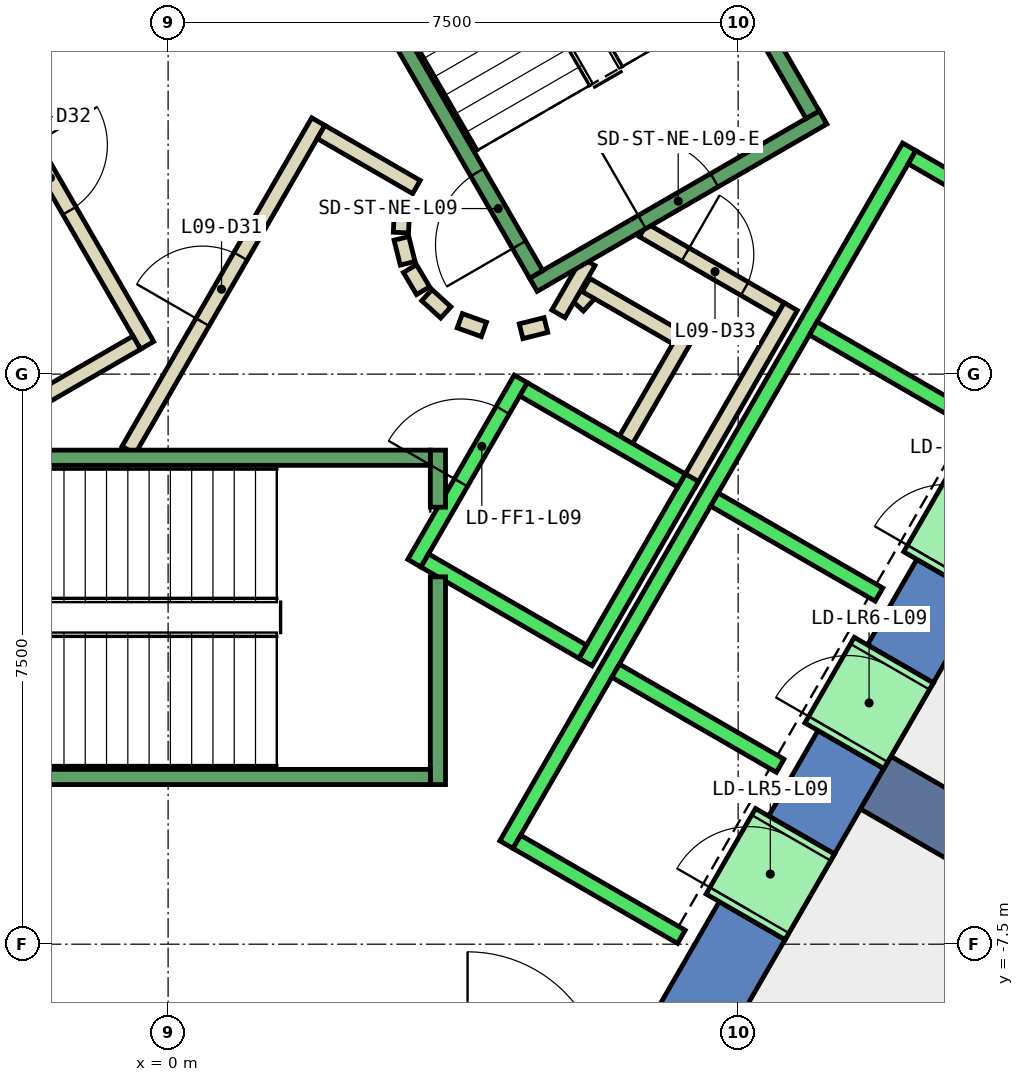
"""IFC4 building model, lengths in metres.
Left out: names, types, materials, properties, quantities, classifications, styles, units other than length and angle.
Written with IfcOpenShell. Run it as: python <this file> out.ifc"""

import sys

from ifc_helpers import new_model, si_unit, direction, frame, frame_2d, origin, place, context, subcontext, project, spatial, polyline, rectangle, outline, extrude, element, fill, save


model = new_model("IFC4")
c1 = context("Model", 3, precision=1e-05, world=origin(), true_north=direction((0.0, 1.0)))
c2 = subcontext(c1, "Body", "Model", "MODEL_VIEW")
j1 = project(units=[si_unit("LENGTHUNIT", "METRE"), si_unit("PLANEANGLEUNIT", "RADIAN")], contexts=[c1])
p1 = place(None, origin())
s1 = spatial("IfcSite", under=j1, at=p1, CompositionType="ELEMENT")
p2 = place(p1, origin())
s2 = spatial("IfcBuilding", under=s1, at=p2, CompositionType="ELEMENT")
p3 = place(p2, frame((0.0, 0.0, 47.6)))
s3 = spatial("IfcBuildingStorey", under=s2, at=p3, CompositionType="ELEMENT", Elevation=47.6)
p4 = place(p3, frame((0.0, 0.0, -0.4)))
e1 = element("IfcWall", 1, at=p4, inside=s3, PredefinedType="SHEAR", context=c2, shape_type="SweptSolid", body=[
    extrude(outline(polyline([(8.517, 11.748), (7.651, 11.248), (12.702, 2.5), (13.856, 2.5), (8.517, 11.748)])), origin(), (0.0, 0.0, 1.0), 4.2),
])
p5 = place(p3, frame((0.0, 0.0, -0.4)))
e2 = element("IfcWall", 2, at=p5, inside=s3, PredefinedType="SHEAR", context=c2, shape_type="SweptSolid", body=[
    extrude(outline(polyline([(8.117, -7.44), (7.252, -6.94), (6.351, -8.5), (6.928, -9.5), (8.117, -7.44)])), origin(), (0.0, 0.0, 1.0), 4.2),
])
p6 = place(p3, frame((0.0, 0.0, -0.4)))
e3 = element("IfcWall", 3, at=p6, inside=s3, PredefinedType="SHEAR", context=c2, shape_type="SweptSolid", body=[
    extrude(outline(polyline([(9.417, -5.189), (8.551, -4.689), (7.902, -5.814), (8.767, -6.314), (9.417, -5.189)])), origin(), (0.0, 0.0, 1.0), 4.2),
])
p7 = place(p3, frame((0.0, 0.0, -0.4)))
e4 = element("IfcWall", 4, at=p7, inside=s3, PredefinedType="SHEAR", context=c2, shape_type="SweptSolid", body=[
    extrude(outline(polyline([(10.717, -2.937), (9.851, -2.437), (9.201, -3.563), (10.067, -4.063), (10.717, -2.937)])), origin(), (0.0, 0.0, 1.0), 4.2),
])
p8 = place(p3, frame((0.0, 0.0, 3.6)))
e5 = element("IfcWall", 5, at=p8, inside=s3, PredefinedType="SHEAR", context=c2, shape_type="SweptSolid", body=[
    extrude(outline(polyline([(8.767, -6.314), (7.902, -5.814), (7.252, -6.94), (8.117, -7.44), (8.767, -6.314)])), origin(), (0.0, 0.0, 1.0), 0.2),
])
p9 = place(p3, frame((0.0, 0.0, 3.6)))
e6 = element("IfcWall", 6, at=p9, inside=s3, PredefinedType="SHEAR", context=c2, shape_type="SweptSolid", body=[
    extrude(outline(polyline([(10.067, -4.063), (9.201, -3.563), (8.551, -4.689), (9.417, -5.189), (10.067, -4.063)])), origin(), (0.0, 0.0, 1.0), 0.2),
])
p10 = place(p3, frame((0.0, 0.0, 3.6)))
e7 = element("IfcWall", 7, at=p10, inside=s3, PredefinedType="SHEAR", context=c2, shape_type="SweptSolid", body=[
    extrude(outline(polyline([(11.367, -1.811), (10.501, -1.311), (9.851, -2.437), (10.717, -2.937), (11.367, -1.811)])), origin(), (0.0, 0.0, 1.0), 0.2),
])
p11 = place(p3, frame((9.31, -5.375, -0.4), z_axis=(0.0, 0.0, 1.0), x_axis=(0.866017533419, -0.500013631625, 0.0)))
e8 = element("IfcWall", 8, at=p11, inside=s3, PredefinedType="SHEAR", context=c2, shape_type="SweptSolid", body=[
    extrude(rectangle(XDim=9.0, YDim=0.8, at=frame_2d((4.5, 0.0))), origin(), (0.0, 0.0, 1.0), 4.2),
])
p12 = place(p3, frame((5.39, 0.898, 0.0), z_axis=(0.0, 0.0, 1.0), x_axis=(0.673828488714, 0.738887791073, 0.0)))
e9 = element("IfcWall", 9, at=p12, inside=s3, PredefinedType="PARTITIONING", context=c2, shape_type="SweptSolid", body=[
    extrude(rectangle(XDim=0.263, YDim=0.2, at=frame_2d((0.131, 0.0))), origin(), (0.0, 0.0, 1.0), 3.8),
])
p13 = place(p3, frame((5.499, 1.172, 0.0), z_axis=(0.0, 0.0, 1.0), x_axis=(0.866333505267, -0.499465972466, 0.0)))
e10 = element("IfcWall", 10, at=p13, inside=s3, PredefinedType="PARTITIONING", context=c2, shape_type="SweptSolid", body=[
    extrude(rectangle(XDim=1.374, YDim=0.2, at=frame_2d((0.687, 0.0))), origin(), (0.0, 0.0, 1.0), 3.8),
])
p14 = place(p3, frame((6.826, 0.522, 0.0), z_axis=(0.0, 0.0, 1.0), x_axis=(-0.500016722714, -0.866015748706, 0.0)))
e11 = element("IfcWall", 11, at=p14, inside=s3, PredefinedType="PARTITIONING", context=c2, shape_type="SweptSolid", body=[
    extrude(rectangle(XDim=1.7, YDim=0.2, at=frame_2d((0.85, 0.0))), origin(), (0.0, 0.0, 1.0), 3.8),
])
p15 = place(p3, frame((6.25, 1.894, 0.0), z_axis=(0.0, 0.0, 1.0), x_axis=(0.866043184279, -0.499969202016, 0.0)))
e12 = element("IfcWall", 12, at=p15, inside=s3, PredefinedType="PARTITIONING", context=c2, shape_type="SweptSolid", body=[
    extrude(rectangle(XDim=2.084, YDim=0.2, at=frame_2d((1.042, 0.0))), origin(), (0.0, 0.0, 1.0), 3.8),
])
p16 = place(p15, frame((0.642, 0.0, 0.0)))
e13 = element("IfcOpeningElement", 13, at=p16, cuts=e12, PredefinedType="OPENING", context=c2, shape_type="SweptSolid", body=[
    extrude(rectangle(XDim=0.9, YDim=2.1, at=frame_2d((0.45, 1.05))), frame((0.0, 0.11, 0.0), z_axis=(0.0, -1.0, 0.0), x_axis=(1.0, 0.0, 0.0)), (0.0, 0.0, 1.0), 0.22),
])
p17 = place(p3, frame((8.192, 0.888, 0.0), z_axis=(0.0, 0.0, 1.0), x_axis=(-0.499940625693, -0.866059680843, 0.0)))
e14 = element("IfcWall", 14, at=p17, inside=s3, PredefinedType="PARTITIONING", context=c2, shape_type="SweptSolid", body=[
    extrude(rectangle(XDim=2.68, YDim=0.2, at=frame_2d((1.34, 0.0))), origin(), (0.0, 0.0, 1.0), 3.8),
])
p18 = place(p3, frame((5.135, 0.793, 0.0), z_axis=(0.0, 0.0, 1.0), x_axis=(0.499526442893, 0.866298639529, 0.0)))
e15 = element("IfcWall", 15, at=p18, inside=s3, PredefinedType="PARTITIONING", context=c2, shape_type="SweptSolid", body=[
    extrude(rectangle(XDim=0.791, YDim=0.2, at=frame_2d((0.396, 0.0))), origin(), (0.0, 0.0, 1.0), 3.8),
])
p19 = place(p3, frame((-0.52, -1.0, 0.0), z_axis=(0.0, 0.0, 1.0), x_axis=(0.50011622646, 0.865958290007, 0.0)))
e16 = element("IfcWall", 16, at=p19, inside=s3, PredefinedType="PARTITIONING", context=c2, shape_type="SweptSolid", body=[
    extrude(rectangle(XDim=4.991, YDim=0.2, at=frame_2d((2.496, 0.0))), origin(), (0.0, 0.0, 1.0), 3.8),
])
p20 = place(p19, frame((1.945, 0.0, 0.0)))
e17 = element("IfcOpeningElement", 17, at=p20, cuts=e16, PredefinedType="OPENING", context=c2, shape_type="SweptSolid", body=[
    extrude(rectangle(XDim=1.0, YDim=2.1, at=frame_2d((0.5, 1.05))), frame((0.0, 0.11, 0.0), z_axis=(0.0, -1.0, 0.0), x_axis=(1.0, 0.0, 0.0)), (0.0, 0.0, 1.0), 0.22),
])
p21 = place(p3, frame((2.012, 3.186, 0.0), z_axis=(0.0, 0.0, 1.0), x_axis=(0.865891012941, -0.500232699559, 0.0)))
e18 = element("IfcWall", 18, at=p21, inside=s3, PredefinedType="PARTITIONING", context=c2, shape_type="SweptSolid", body=[
    extrude(rectangle(XDim=1.449, YDim=0.2, at=frame_2d((0.725, 0.0))), origin(), (0.0, 0.0, 1.0), 3.8),
])
p22 = place(p3, frame((3.079, 2.199, 0.0), z_axis=(0.0, 0.0, 1.0), x_axis=(-0.047771483479, -0.998858290933, 0.0)))
e19 = element("IfcWall", 19, at=p22, inside=s3, PredefinedType="PARTITIONING", context=c2, shape_type="SweptSolid", body=[
    extrude(rectangle(XDim=0.337, YDim=0.2, at=frame_2d((0.169, 0.0))), origin(), (0.0, 0.0, 1.0), 3.8),
])
p23 = place(p3, frame((3.07, 1.786, 0.0), z_axis=(0.0, 0.0, 1.0), x_axis=(0.242705583207, -0.970099994784, 0.0)))
e20 = element("IfcWall", 20, at=p23, inside=s3, PredefinedType="PARTITIONING", context=c2, shape_type="SweptSolid", body=[
    extrude(rectangle(XDim=0.338, YDim=0.2, at=frame_2d((0.169, 0.0))), origin(), (0.0, 0.0, 1.0), 3.8),
])
for number, where, z_axis, x_axis in (
    (21, (3.182, 1.388, 0.0), (0.0, 0.0, 1.0), (0.512, -0.859, 0.0)),
    (22, (3.404, 1.039, 0.0), (0.0, 0.0, 1.0), (0.74, -0.672, 0.0)),
):
    element("IfcWall", number, at=place(p3, frame(where, z_axis=z_axis, x_axis=x_axis)), inside=s3, PredefinedType="PARTITIONING", context=c2, shape_type="SweptSolid", body=[
        extrude(rectangle(XDim=0.338, YDim=0.2, at=frame_2d((0.169, 0.0))), origin(), (0.0, 0.0, 1.0), 3.8),
    ])
p24 = place(p3, frame((3.838, 0.702, 0.0), z_axis=(0.0, 0.0, 1.0), x_axis=(0.941035081519, -0.338308993895, 0.0)))
e23 = element("IfcWall", 23, at=p24, inside=s3, PredefinedType="PARTITIONING", context=c2, shape_type="SweptSolid", body=[
    extrude(rectangle(XDim=0.337, YDim=0.2, at=frame_2d((0.168, 0.0))), origin(), (0.0, 0.0, 1.0), 3.8),
])
p25 = place(p3, frame((4.644, 0.564, 0.0), z_axis=(0.0, 0.0, 1.0), x_axis=(0.969929076366, 0.243387729394, 0.0)))
e24 = element("IfcWall", 24, at=p25, inside=s3, PredefinedType="PARTITIONING", context=c2, shape_type="SweptSolid", body=[
    extrude(rectangle(XDim=0.337, YDim=0.2, at=frame_2d((0.168, 0.0))), origin(), (0.0, 0.0, 1.0), 3.8),
])
p26 = place(p3, frame((-2.771, 4.7, 0.0), z_axis=(0.0, 0.0, 1.0), x_axis=(0.499969479948, -0.866043023828, 0.0)))
e25 = element("IfcWall", 25, at=p26, inside=s3, PredefinedType="PARTITIONING", context=c2, shape_type="SweptSolid", body=[
    extrude(rectangle(XDim=4.99, YDim=0.2, at=frame_2d((2.495, 0.0))), origin(), (0.0, 0.0, 1.0), 3.8),
])
p27 = place(p26, frame((1.945, 0.0, 0.0)))
e26 = element("IfcOpeningElement", 26, at=p27, cuts=e25, PredefinedType="OPENING", context=c2, shape_type="SweptSolid", body=[
    extrude(rectangle(XDim=1.0, YDim=2.1, at=frame_2d((0.5, 1.05))), frame((0.0, 0.11, 0.0), z_axis=(0.0, -1.0, 0.0), x_axis=(1.0, 0.0, 0.0)), (0.0, 0.0, 1.0), 0.22),
])
p28 = place(p3, frame((-0.412, 0.414, 0.0), z_axis=(0.0, 0.0, 1.0), x_axis=(-0.866017369001, -0.500013916395, 0.0)))
e27 = element("IfcWall", 27, at=p28, inside=s3, PredefinedType="PARTITIONING", context=c2, shape_type="SweptSolid", body=[
    extrude(rectangle(XDim=1.45, YDim=0.2, at=frame_2d((0.725, 0.0))), origin(), (0.0, 0.0, 1.0), 3.8),
])
p29 = place(p3, frame((12.401, -7.621, 0.0), z_axis=(0.0, 0.0, 1.0), x_axis=(-0.499983724212, -0.866034800411, 0.0)))
e28 = element("IfcWall", 28, at=p29, inside=s3, PredefinedType="PARTITIONING", context=c2, shape_type="SweptSolid", body=[
    extrude(rectangle(XDim=9.302, YDim=0.2, at=frame_2d((4.651, 0.0))), origin(), (0.0, 0.0, 1.0), 3.8),
])
p30 = place(p3, frame((3.24, -2.488, 0.0), z_axis=(0.0, 0.0, 1.0), x_axis=(0.49994636267, 0.866056369097, 0.0)))
e29 = element("IfcWall", 29, at=p30, inside=s3, PredefinedType="STANDARD", context=c2, shape_type="SweptSolid", body=[
    extrude(rectangle(XDim=2.8, YDim=0.2, at=frame_2d((1.4, 0.0))), origin(), (0.0, 0.0, 1.0), 3.8),
])
p31 = place(p30, frame((1.225, 0.0, 0.0)))
e30 = element("IfcOpeningElement", 30, at=p31, cuts=e29, PredefinedType="OPENING", context=c2, shape_type="SweptSolid", body=[
    extrude(rectangle(XDim=1.1, YDim=2.1, at=frame_2d((0.55, 1.05))), frame((0.0, 0.11, 0.0), z_axis=(0.0, -1.0, 0.0), x_axis=(1.0, 0.0, 0.0)), (0.0, 0.0, 1.0), 0.22),
])
p32 = place(p3, frame((5.492, -3.788, 0.0), z_axis=(0.0, 0.0, 1.0), x_axis=(0.500011755427, 0.866018616679, 0.0)))
e31 = element("IfcWall", 31, at=p32, inside=s3, PredefinedType="STANDARD", context=c2, shape_type="SweptSolid", body=[
    extrude(rectangle(XDim=2.8, YDim=0.2, at=frame_2d((1.4, 0.0))), origin(), (0.0, 0.0, 1.0), 3.8),
])
p33 = place(p3, frame((3.377, -2.452, 0.0), z_axis=(0.0, 0.0, 1.0), x_axis=(0.865955154139, -0.50012165622, 0.0)))
e32 = element("IfcWall", 32, at=p33, inside=s3, PredefinedType="STANDARD", context=c2, shape_type="SweptSolid", body=[
    extrude(rectangle(XDim=2.4, YDim=0.2, at=frame_2d((1.2, 0.0))), origin(), (0.0, 0.0, 1.0), 3.8),
])
p34 = place(p3, frame((4.677, -0.2, 0.0), z_axis=(0.0, 0.0, 1.0), x_axis=(0.865973769406, -0.500089422704, 0.0)))
e33 = element("IfcWall", 33, at=p34, inside=s3, PredefinedType="STANDARD", context=c2, shape_type="SweptSolid", body=[
    extrude(rectangle(XDim=2.399, YDim=0.2, at=frame_2d((1.2, 0.0))), origin(), (0.0, 0.0, 1.0), 3.8),
])
p35 = place(p3, frame((4.451, -6.19, 0.0), z_axis=(0.0, 0.0, 1.0), x_axis=(0.50000090737, 0.866024879913, 0.0)))
e34 = element("IfcWall", 34, at=p35, inside=s3, PredefinedType="STANDARD", context=c2, shape_type="SweptSolid", body=[
    extrude(rectangle(XDim=10.6, YDim=0.2, at=frame_2d((5.3, 0.0))), origin(), (0.0, 0.0, 1.0), 3.8),
])
for number, where, z_axis, x_axis in (
    (35, (4.588, -6.153, 0.0), (0.0, 0.0, 1.0), (0.866, -0.5, 0.0)),
    (36, (5.888, -3.902, 0.0), (0.0, 0.0, 1.0), (0.866, -0.5, 0.0)),
    (37, (7.188, -1.65, 0.0), (0.0, 0.0, 1.0), (0.866, -0.5, 0.0)),
    (38, (8.488, 0.602, 0.0), (0.0, 0.0, 1.0), (0.866, -0.5, 0.0)),
):
    element("IfcWall", number, at=place(p3, frame(where, z_axis=z_axis, x_axis=x_axis)), inside=s3, PredefinedType="STANDARD", context=c2, shape_type="SweptSolid", body=[
        extrude(rectangle(XDim=2.5, YDim=0.2, at=frame_2d((1.25, 0.0))), origin(), (0.0, 0.0, 1.0), 3.8),
    ])
p36 = place(p3, frame((9.788, 2.853, 0.0), z_axis=(0.0, 0.0, 1.0), x_axis=(0.865998541277, -0.500046524342, 0.0)))
e39 = element("IfcWall", 39, at=p36, inside=s3, PredefinedType="STANDARD", context=c2, shape_type="SweptSolid", body=[
    extrude(rectangle(XDim=2.5, YDim=0.2, at=frame_2d((1.25, 0.0))), origin(), (0.0, 0.0, 1.0), 3.8),
])
p37 = place(p3, frame((7.598, -7.14, 0.0), z_axis=(0.0, 0.0, 1.0), x_axis=(0.500362116554, 0.865816234728, 0.0)))
e40 = element("IfcWall", 40, at=p37, inside=s3, PredefinedType="STANDARD", context=c2, shape_type="SweptSolid", body=[
    extrude(rectangle(XDim=1.299, YDim=1.2, at=frame_2d((0.65, 0.0))), origin(), (0.0, 0.0, 1.0), 2.4),
])
p38 = place(p37, frame((0.1, 0.0, 0.0)))
e41 = element("IfcOpeningElement", 41, at=p38, cuts=e40, PredefinedType="OPENING", context=c2, shape_type="SweptSolid", body=[
    extrude(rectangle(XDim=1.1, YDim=2.3, at=frame_2d((0.55, 1.15))), frame((0.0, 0.61, 0.0), z_axis=(0.0, -1.0, 0.0), x_axis=(1.0, 0.0, 0.0)), (0.0, 0.0, 1.0), 1.22),
])
p39 = place(p3, frame((8.898, -4.889, 0.0), z_axis=(0.0, 0.0, 1.0), x_axis=(0.500036693733, 0.866004217611, 0.0)))
e42 = element("IfcWall", 42, at=p39, inside=s3, PredefinedType="STANDARD", context=c2, shape_type="SweptSolid", body=[
    extrude(rectangle(XDim=1.3, YDim=1.2, at=frame_2d((0.65, 0.0))), origin(), (0.0, 0.0, 1.0), 2.4),
])
p40 = place(p39, frame((0.1, 0.0, 0.0)))
e43 = element("IfcOpeningElement", 43, at=p40, cuts=e42, PredefinedType="OPENING", context=c2, shape_type="SweptSolid", body=[
    extrude(rectangle(XDim=1.1, YDim=2.3, at=frame_2d((0.55, 1.15))), frame((0.0, 0.61, 0.0), z_axis=(0.0, -1.0, 0.0), x_axis=(1.0, 0.0, 0.0)), (0.0, 0.0, 1.0), 1.22),
])
p41 = place(p3, frame((10.198, -2.637, 0.0), z_axis=(0.0, 0.0, 1.0), x_axis=(0.49989585183, 0.866085525409, 0.0)))
e44 = element("IfcWall", 44, at=p41, inside=s3, PredefinedType="STANDARD", context=c2, shape_type="SweptSolid", body=[
    extrude(rectangle(XDim=1.3, YDim=1.2, at=frame_2d((0.65, 0.0))), origin(), (0.0, 0.0, 1.0), 2.4),
])
p42 = place(p41, frame((0.1, 0.0, 0.0)))
e45 = element("IfcOpeningElement", 45, at=p42, cuts=e44, PredefinedType="OPENING", context=c2, shape_type="SweptSolid", body=[
    extrude(rectangle(XDim=1.1, YDim=2.3, at=frame_2d((0.55, 1.15))), frame((0.0, 0.61, 0.0), z_axis=(0.0, -1.0, 0.0), x_axis=(1.0, 0.0, 0.0)), (0.0, 0.0, 1.0), 1.22),
])
p43 = place(p3, frame((3.55, -2.667, 0.0), z_axis=(0.0, 0.0, 1.0), x_axis=(0.0, -1.0, 0.0)))
e46 = element("IfcWall", 46, at=p43, inside=s3, PredefinedType="STANDARD", context=c2, shape_type="SweptSolid", body=[
    extrude(rectangle(XDim=2.733, YDim=0.2, at=frame_2d((1.366, 0.0))), origin(), (0.0, 0.0, 1.0), 3.8),
])
p44 = place(p3, frame((3.55, -1.0, 0.0), z_axis=(0.0, 0.0, 1.0), x_axis=(0.0, -1.0, 0.0)))
e47 = element("IfcWall", 47, at=p44, inside=s3, PredefinedType="STANDARD", context=c2, shape_type="SweptSolid", body=[
    extrude(rectangle(XDim=0.751, YDim=0.2, at=frame_2d((0.375, 0.0))), origin(), (0.0, 0.0, 1.0), 3.8),
])
p45 = place(p3, frame((-3.45, -1.1, 0.0), z_axis=(0.0, 0.0, 1.0), x_axis=(1.0, 0.0, 0.0)))
e48 = element("IfcWall", 48, at=p45, inside=s3, PredefinedType="STANDARD", context=c2, shape_type="SweptSolid", body=[
    extrude(rectangle(XDim=6.9, YDim=0.2, at=frame_2d((3.45, 0.0))), origin(), (0.0, 0.0, 1.0), 3.8),
])
p46 = place(p45, frame((0.45, 0.0, 0.0)))
e49 = element("IfcOpeningElement", 49, at=p46, cuts=e48, PredefinedType="OPENING", context=c2, shape_type="SweptSolid", body=[
    extrude(rectangle(XDim=1.1, YDim=2.2, at=frame_2d((0.55, 1.1))), frame((0.0, 0.11, 0.0), z_axis=(0.0, -1.0, 0.0), x_axis=(1.0, 0.0, 0.0)), (0.0, 0.0, 1.0), 0.22),
])
p47 = place(p3, frame((-3.45, -5.3, 0.0), z_axis=(0.0, 0.0, 1.0), x_axis=(1.0, 0.0, 0.0)))
e50 = element("IfcWall", 50, at=p47, inside=s3, PredefinedType="STANDARD", context=c2, shape_type="SweptSolid", body=[
    extrude(rectangle(XDim=6.9, YDim=0.2, at=frame_2d((3.45, 0.0))), origin(), (0.0, 0.0, 1.0), 3.8),
])
p48 = place(p3, frame((4.806, 1.176, 0.0), z_axis=(0.0, 0.0, 1.0), x_axis=(0.866059941101, 0.499940174841, 0.0)))
e51 = element("IfcWall", 51, at=p48, inside=s3, PredefinedType="STANDARD", context=c2, shape_type="SweptSolid", body=[
    extrude(rectangle(XDim=4.4, YDim=0.2, at=frame_2d((2.2, 0.0))), origin(), (0.0, 0.0, 1.0), 3.8),
])
p49 = place(p48, frame((1.65, 0.0, 0.0)))
e52 = element("IfcOpeningElement", 52, at=p49, cuts=e51, PredefinedType="OPENING", context=c2, shape_type="SweptSolid", body=[
    extrude(rectangle(XDim=1.1, YDim=2.2, at=frame_2d((0.55, 1.1))), frame((0.0, 0.11, 0.0), z_axis=(0.0, -1.0, 0.0), x_axis=(1.0, 0.0, 0.0)), (0.0, 0.0, 1.0), 0.22),
])
p50 = place(p3, frame((4.843, 1.312, 0.0), z_axis=(0.0, 0.0, 1.0), x_axis=(-0.499963383562, 0.866046543262, 0.0)))
e53 = element("IfcWall", 53, at=p50, inside=s3, PredefinedType="STANDARD", context=c2, shape_type="SweptSolid", body=[
    extrude(rectangle(XDim=6.9, YDim=0.2, at=frame_2d((3.45, 0.0))), origin(), (0.0, 0.0, 1.0), 3.8),
])
p51 = place(p50, frame((0.45, 0.0, 0.0)))
e54 = element("IfcOpeningElement", 54, at=p51, cuts=e53, PredefinedType="OPENING", context=c2, shape_type="SweptSolid", body=[
    extrude(rectangle(XDim=1.1, YDim=2.2, at=frame_2d((0.55, 1.1))), frame((0.0, 0.11, 0.0), z_axis=(0.0, -1.0, 0.0), x_axis=(1.0, 0.0, 0.0)), (0.0, 0.0, 1.0), 0.22),
])
p52 = place(p3, frame((8.48, 3.412, 0.0), z_axis=(0.0, 0.0, 1.0), x_axis=(-0.499978703459, 0.866037698999, 0.0)))
e55 = element("IfcWall", 55, at=p52, inside=s3, PredefinedType="STANDARD", context=c2, shape_type="SweptSolid", body=[
    extrude(rectangle(XDim=6.9, YDim=0.2, at=frame_2d((3.45, 0.0))), origin(), (0.0, 0.0, 1.0), 3.8),
])
p53 = place(p3, frame((-1.393, 7.288, 0.0), z_axis=(0.0, 0.0, 1.0), x_axis=(-0.499963383562, -0.866046543262, 0.0)))
e56 = element("IfcWall", 56, at=p53, inside=s3, PredefinedType="STANDARD", context=c2, shape_type="SweptSolid", body=[
    extrude(rectangle(XDim=6.9, YDim=0.2, at=frame_2d((3.45, 0.0))), origin(), (0.0, 0.0, 1.0), 3.8),
])
p54 = place(p53, frame((0.45, 0.0, 0.0)))
e57 = element("IfcOpeningElement", 57, at=p54, cuts=e56, PredefinedType="OPENING", context=c2, shape_type="SweptSolid", body=[
    extrude(rectangle(XDim=1.1, YDim=2.2, at=frame_2d((0.55, 1.1))), frame((0.0, 0.11, 0.0), z_axis=(0.0, -1.0, 0.0), x_axis=(1.0, 0.0, 0.0)), (0.0, 0.0, 1.0), 0.22),
])
p55 = place(p20, origin())
e58 = element("IfcDoor", 58, at=p55, inside=s3, OperationType="SINGLE_SWING_LEFT", PredefinedType="DOOR", context=c2, shape_type="SweptSolid", body=[
    extrude(rectangle(XDim=1.0, YDim=2.1, at=frame_2d((0.5, 1.05))), frame((0.0, 0.025, 0.0), z_axis=(0.0, -1.0, 0.0), x_axis=(1.0, 0.0, 0.0)), (0.0, 0.0, 1.0), 0.05),
])
fill(e17, e58)
p56 = place(p27, origin())
e59 = element("IfcDoor", 59, at=p56, inside=s3, OperationType="SINGLE_SWING_RIGHT", PredefinedType="DOOR", context=c2, shape_type="SweptSolid", body=[
    extrude(rectangle(XDim=1.0, YDim=2.1, at=frame_2d((0.5, 1.05))), frame((0.0, 0.025, 0.0), z_axis=(0.0, -1.0, 0.0), x_axis=(1.0, 0.0, 0.0)), (0.0, 0.0, 1.0), 0.05),
])
fill(e26, e59)
p57 = place(p16, origin())
e60 = element("IfcDoor", 60, at=p57, inside=s3, OperationType="SINGLE_SWING_LEFT", PredefinedType="DOOR", context=c2, shape_type="SweptSolid", body=[
    extrude(rectangle(XDim=0.9, YDim=2.1, at=frame_2d((0.45, 1.05))), frame((0.0, 0.025, 0.0), z_axis=(0.0, -1.0, 0.0), x_axis=(1.0, 0.0, 0.0)), (0.0, 0.0, 1.0), 0.05),
])
fill(e13, e60)
p58 = place(p38, origin())
e61 = element("IfcDoor", 61, at=p58, inside=s3, OperationType="SLIDING_TO_LEFT", PredefinedType="DOOR", context=c2, shape_type="SweptSolid", body=[
    extrude(rectangle(XDim=1.1, YDim=2.3, at=frame_2d((0.55, 1.15))), frame((0.0, 0.025, 0.0), z_axis=(0.0, -1.0, 0.0), x_axis=(1.0, 0.0, 0.0)), (0.0, 0.0, 1.0), 0.05),
])
fill(e41, e61)
p59 = place(p40, origin())
e62 = element("IfcDoor", 62, at=p59, inside=s3, OperationType="SLIDING_TO_LEFT", PredefinedType="DOOR", context=c2, shape_type="SweptSolid", body=[
    extrude(rectangle(XDim=1.1, YDim=2.3, at=frame_2d((0.55, 1.15))), frame((0.0, 0.025, 0.0), z_axis=(0.0, -1.0, 0.0), x_axis=(1.0, 0.0, 0.0)), (0.0, 0.0, 1.0), 0.05),
])
fill(e43, e62)
p60 = place(p31, origin())
e63 = element("IfcDoor", 63, at=p60, inside=s3, OperationType="SLIDING_TO_LEFT", PredefinedType="DOOR", context=c2, shape_type="SweptSolid", body=[
    extrude(rectangle(XDim=1.1, YDim=2.1, at=frame_2d((0.55, 1.05))), frame((0.0, 0.025, 0.0), z_axis=(0.0, -1.0, 0.0), x_axis=(1.0, 0.0, 0.0)), (0.0, 0.0, 1.0), 0.05),
])
fill(e30, e63)
p61 = place(p51, origin())
e64 = element("IfcDoor", 64, at=p61, inside=s3, OperationType="SINGLE_SWING_LEFT", PredefinedType="DOOR", context=c2, shape_type="SweptSolid", body=[
    extrude(rectangle(XDim=1.1, YDim=2.2, at=frame_2d((0.55, 1.1))), frame((0.0, 0.025, 0.0), z_axis=(0.0, -1.0, 0.0), x_axis=(1.0, 0.0, 0.0)), (0.0, 0.0, 1.0), 0.05),
])
fill(e54, e64)
p62 = place(p49, origin())
e65 = element("IfcDoor", 65, at=p62, inside=s3, OperationType="SINGLE_SWING_LEFT", PredefinedType="DOOR", context=c2, shape_type="SweptSolid", body=[
    extrude(rectangle(XDim=1.1, YDim=2.2, at=frame_2d((0.55, 1.1))), frame((0.0, 0.025, 0.0), z_axis=(0.0, -1.0, 0.0), x_axis=(1.0, 0.0, 0.0)), (0.0, 0.0, 1.0), 0.05),
])
fill(e52, e65)
save(model, sys.argv[1])
